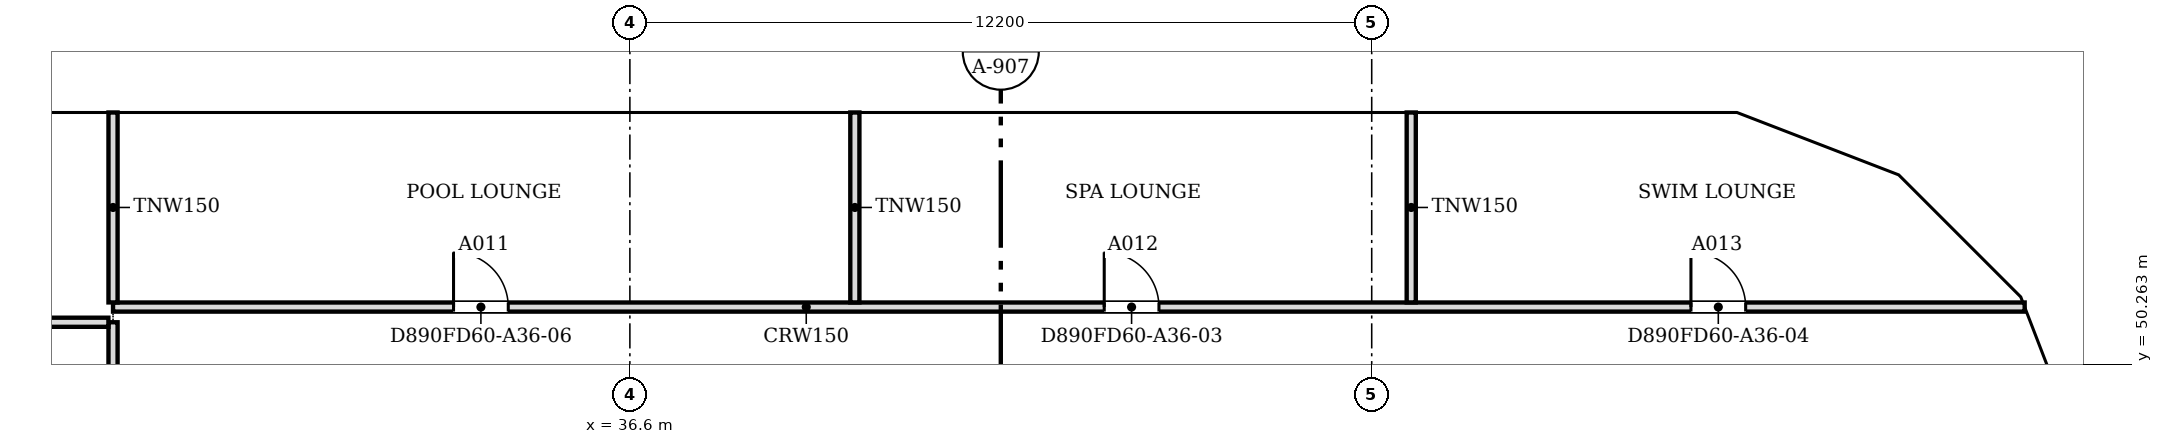
"""IFC4 building model, lengths in metres.
Left out: names, types, materials, properties, quantities, classifications, styles, units other than length and angle.
Written with IfcOpenShell. Run it as: python <this file> out.ifc"""

import sys

from ifc_helpers import new_model, si_unit, direction, frame, frame_2d, origin, place, context, subcontext, project, spatial, polyline, rectangle, outline, extrude, faceted_brep, source, transform, mapped, element, fill, save


model = new_model("IFC4")
c1 = context("Model", 3, precision=1e-05, world=origin(), true_north=direction((0.0, 1.0)))
c2 = subcontext(c1, "Body", "Model", "MODEL_VIEW")
j1 = project(units=[si_unit("LENGTHUNIT", "METRE"), si_unit("PLANEANGLEUNIT", "RADIAN")], contexts=[c1])
p1 = place(None, origin())
s1 = spatial("IfcSite", under=j1, at=p1, CompositionType="ELEMENT")
p2 = place(p1, origin())
s2 = spatial("IfcBuilding", under=s1, at=p2, CompositionType="ELEMENT")
p3 = place(p2, frame((0.0, 0.0, 236.9)))
s3 = spatial("IfcBuildingStorey", under=s2, at=p3, CompositionType="ELEMENT", Elevation=236.9)
m1 = source(origin(), c2, "Body", "Brep", [
    faceted_brep([(3.003, -0.25, 3.732), (2.95, -0.25, 3.8), (0.0, -0.25, 0.0), (3.003, -0.25, 0.0), (0.047, 0.25, 0.06), (2.898, 0.25, 3.732), (2.898, 0.25, 0.0), (0.047, 0.25, 0.0), (2.95, 0.0, 3.8), (0.0, 0.0, 0.0)], [[[0, 1, 2, 3]], [[4, 5, 6, 7]], [[8, 1, 0]], [[5, 4, 9, 2, 1, 8]], [[7, 6, 3, 2, 9]], [[7, 9, 4]], [[3, 6, 5, 8, 0]]]),
])
p4 = place(p3, frame((60.75, 48.753, 0.0), z_axis=(0.0, 0.0, 1.0), x_axis=(-0.35992665181, 0.932980602862, 0.0)))
e1 = element("IfcWall", 1, at=p4, inside=s3, PredefinedType="SOLIDWALL", context=c2, shape_type="MappedRepresentation", body=[
    mapped(m1, transform((0.0, 0.0, 0.0), scale=1.0)),
])
m2 = source(origin(), c2, "Body", "SweptSolid", [
    extrude(outline(polyline([(2.75, 3.135), (0.511, 0.25), (2.75, 0.25), (2.75, 3.135)])), frame((0.0, 0.26, 0.0), z_axis=(0.0, -1.0, 0.0), x_axis=(1.0, 0.0, 0.0)), (0.0, 0.0, 1.0), 0.52),
])
p5 = place(p4, origin())
e2 = element("IfcOpeningElement", 2, at=p5, cuts=e1, PredefinedType="OPENING", context=c2, shape_type="MappedRepresentation", body=[
    mapped(m2, transform((0.0, 0.0, 0.0), scale=1.0)),
])
m3 = source(origin(), c2, "Body", "Brep", [
    faceted_brep([(2.997, -0.25, 0.0), (0.053, -0.25, 3.8), (0.0, -0.25, 3.732), (0.0, -0.25, 0.0), (0.106, 0.25, 3.732), (2.944, 0.25, 0.068), (2.944, 0.25, 0.0), (0.106, 0.25, 0.0), (0.053, 0.0, 3.8), (2.997, 0.0, 0.0)], [[[0, 1, 2, 3]], [[4, 5, 6, 7]], [[5, 4, 8, 1, 0, 9]], [[2, 1, 8]], [[7, 6, 9, 0, 3]], [[7, 3, 2, 8, 4]], [[9, 6, 5]]]),
])
p6 = place(p3, frame((59.726, 51.469, 0.0), z_axis=(0.0, 0.0, 1.0), x_axis=(-0.707106781187, 0.707106781187, 0.0)))
e3 = element("IfcWall", 3, at=p6, inside=s3, PredefinedType="SOLIDWALL", context=c2, shape_type="MappedRepresentation", body=[
    mapped(m3, transform((0.0, 0.0, 0.0), scale=1.0)),
])
m4 = source(origin(), c2, "Body", "SweptSolid", [
    extrude(outline(polyline([(2.487, 0.25), (0.253, 3.134), (0.253, 0.25), (2.487, 0.25)])), frame((0.0, 0.26, 0.0), z_axis=(0.0, -1.0, 0.0), x_axis=(1.0, 0.0, 0.0)), (0.0, 0.0, 1.0), 0.52),
])
p7 = place(p6, origin())
e4 = element("IfcOpeningElement", 4, at=p7, cuts=e3, PredefinedType="OPENING", context=c2, shape_type="MappedRepresentation", body=[
    mapped(m4, transform((0.0, 0.0, 0.0), scale=1.0)),
])
m5 = source(origin(), c2, "Body", "Brep", [
    faceted_brep([(2.997, -0.25, 3.741), (2.95, -0.25, 3.8), (0.0, -0.25, 0.0), (2.997, -0.25, 0.0), (0.053, 0.25, 0.068), (2.904, 0.25, 3.74), (2.904, 0.25, 0.0), (0.053, 0.25, 0.0), (2.95, 0.0, 3.8), (0.0, 0.0, 0.0)], [[[0, 1, 2, 3]], [[4, 5, 6, 7]], [[8, 1, 0]], [[5, 4, 9, 2, 1, 8]], [[7, 6, 3, 2, 9]], [[7, 9, 4]], [[3, 6, 5, 8, 0]]]),
])
p8 = place(p3, frame((57.606, 53.588, 0.0), z_axis=(0.0, 0.0, 1.0), x_axis=(-0.932990326376, 0.359901446078, 0.0)))
e5 = element("IfcWall", 5, at=p8, inside=s3, PredefinedType="SOLIDWALL", context=c2, shape_type="MappedRepresentation", body=[
    mapped(m5, transform((0.0, 0.0, 0.0), scale=1.0)),
])
p9 = place(p8, origin())
e6 = element("IfcOpeningElement", 6, at=p9, cuts=e5, PredefinedType="OPENING", context=c2, shape_type="MappedRepresentation", body=[
    mapped(m2, transform((0.0, 0.0, 0.0), scale=1.0)),
])
m6 = source(origin(), c2, "Body", "Brep", [
    faceted_brep([(3.05, -0.25, 0.0), (0.047, -0.25, 3.8), (0.0, -0.25, 3.74), (0.0, -0.25, 0.0), (0.093, 0.25, 3.741), (3.05, 0.25, 0.0), (0.093, 0.25, 0.0), (0.047, 0.0, 3.8)], [[[0, 1, 2, 3]], [[4, 5, 6]], [[5, 4, 7, 1, 0]], [[2, 1, 7]], [[6, 5, 0, 3]], [[6, 3, 2, 7, 4]]]),
])
p10 = place(p3, frame((54.9, 54.65, 0.0), z_axis=(0.0, 0.0, 1.0), x_axis=(-1.0, 0.0, 0.0)))
e7 = element("IfcWall", 7, at=p10, inside=s3, PredefinedType="SOLIDWALL", context=c2, shape_type="MappedRepresentation", body=[
    mapped(m6, transform((0.0, 0.0, 0.0), scale=1.0)),
])
m7 = source(origin(), c2, "Body", "SweptSolid", [
    extrude(outline(polyline([(2.534, 0.25), (0.247, 3.144), (0.247, 0.25), (2.534, 0.25)])), frame((0.0, 0.26, 0.0), z_axis=(0.0, -1.0, 0.0), x_axis=(1.0, 0.0, 0.0)), (0.0, 0.0, 1.0), 0.52),
])
p11 = place(p10, origin())
e8 = element("IfcOpeningElement", 8, at=p11, cuts=e7, PredefinedType="OPENING", context=c2, shape_type="MappedRepresentation", body=[
    mapped(m7, transform((0.0, 0.0, 0.0), scale=1.0)),
])
m8 = source(origin(), c2, "Body", "SweptSolid", [
    extrude(outline(polyline([(6.1, 0.0), (3.05, 3.8), (0.0, 0.0), (6.1, 0.0)])), frame((0.0, 0.25, 0.0), z_axis=(0.0, -1.0, 0.0), x_axis=(1.0, 0.0, 0.0)), (0.0, 0.0, 1.0), 0.5),
])
p12 = place(p3, frame((51.85, 54.65, 0.0), z_axis=(0.0, 0.0, 1.0), x_axis=(-1.0, 0.0, 0.0)))
e9 = element("IfcWall", 9, at=p12, inside=s3, PredefinedType="SOLIDWALL", context=c2, shape_type="MappedRepresentation", body=[
    mapped(m8, transform((0.0, 0.0, 0.0), scale=1.0)),
])
m9 = source(origin(), c2, "Body", "SweptSolid", [
    extrude(outline(polyline([(5.579, 0.25), (3.05, 3.401), (0.521, 0.25), (5.579, 0.25)])), frame((0.0, 0.26, 0.0), z_axis=(0.0, -1.0, 0.0), x_axis=(1.0, 0.0, 0.0)), (0.0, 0.0, 1.0), 0.52),
])
p13 = place(p12, origin())
e10 = element("IfcOpeningElement", 10, at=p13, cuts=e9, PredefinedType="OPENING", context=c2, shape_type="MappedRepresentation", body=[
    mapped(m9, transform((0.0, 0.0, 0.0), scale=1.0)),
])
p14 = place(p3, frame((45.75, 54.65, 0.0), z_axis=(0.0, 0.0, 1.0), x_axis=(-1.0, 0.0, 0.0)))
e11 = element("IfcWall", 11, at=p14, inside=s3, PredefinedType="SOLIDWALL", context=c2, shape_type="MappedRepresentation", body=[
    mapped(m8, transform((0.0, 0.0, 0.0), scale=1.0)),
])
p15 = place(p14, origin())
e12 = element("IfcOpeningElement", 12, at=p15, cuts=e11, PredefinedType="OPENING", context=c2, shape_type="MappedRepresentation", body=[
    mapped(m9, transform((0.0, 0.0, 0.0), scale=1.0)),
])
m10 = source(origin(), c2, "Body", "Brep", [
    faceted_brep([(6.1, -0.25, 0.0), (3.05, -0.25, 3.8), (0.0, -0.25, 0.0), (6.1, -0.25, 0.0), (0.0, 0.25, 0.0), (3.05, 0.25, 3.8), (6.1, 0.25, 0.0), (6.1, 0.25, 0.0)], [[[0, 1, 2, 3]], [[4, 5, 6, 7]], [[6, 5, 1, 0]], [[5, 4, 2, 1]], [[4, 7, 3, 2]], [[3, 7, 6, 0]]]),
])
p16 = place(p3, frame((39.65, 54.65, 0.0), z_axis=(0.0, 0.0, 1.0), x_axis=(-1.0, 0.0, 0.0)))
e13 = element("IfcWall", 13, at=p16, inside=s3, PredefinedType="SOLIDWALL", context=c2, shape_type="MappedRepresentation", body=[
    mapped(m10, transform((0.0, 0.0, 0.0), scale=1.0)),
])
p17 = place(p16, origin())
e14 = element("IfcOpeningElement", 14, at=p17, cuts=e13, PredefinedType="OPENING", context=c2, shape_type="MappedRepresentation", body=[
    mapped(m9, transform((0.0, 0.0, 0.0), scale=1.0)),
])
p18 = place(p3, frame((33.55, 54.65, 0.0), z_axis=(0.0, 0.0, 1.0), x_axis=(-1.0, 0.0, 0.0)))
e15 = element("IfcWall", 15, at=p18, inside=s3, PredefinedType="SOLIDWALL", context=c2, shape_type="MappedRepresentation", body=[
    mapped(m8, transform((0.0, 0.0, 0.0), scale=1.0)),
])
p19 = place(p18, origin())
e16 = element("IfcOpeningElement", 16, at=p19, cuts=e15, PredefinedType="OPENING", context=c2, shape_type="MappedRepresentation", body=[
    mapped(m9, transform((0.0, 0.0, 0.0), scale=1.0)),
])
p20 = place(p3, frame((27.45, 54.65, 0.0), z_axis=(0.0, 0.0, 1.0), x_axis=(-1.0, 0.0, 0.0)))
e17 = element("IfcWall", 17, at=p20, inside=s3, PredefinedType="SOLIDWALL", context=c2, shape_type="MappedRepresentation", body=[
    mapped(m10, transform((0.0, 0.0, 0.0), scale=1.0)),
])
p21 = place(p20, origin())
e18 = element("IfcOpeningElement", 18, at=p21, cuts=e17, PredefinedType="OPENING", context=c2, shape_type="MappedRepresentation", body=[
    mapped(m9, transform((0.0, 0.0, 0.0), scale=1.0)),
])
p22 = place(p2, frame((0.0, 0.0, 240.7)))
s4 = spatial("IfcBuildingStorey", under=s2, at=p22, CompositionType="ELEMENT", Elevation=240.7)
m11 = source(origin(), c2, "Body", "Brep", [
    faceted_brep([(0.047, -0.25, 0.0), (2.997, -0.25, 3.8), (0.047, -0.25, 7.6), (0.0, -0.25, 7.541), (0.0, -0.25, 0.059), (0.093, 0.25, 7.54), (2.944, 0.25, 3.868), (2.944, 0.25, 3.732), (0.093, 0.25, 0.06), (2.997, 0.0, 3.8), (0.047, 0.0, 0.0), (0.047, 0.0, 7.6)], [[[0, 1, 2, 3, 4]], [[5, 6, 7, 8]], [[8, 7, 9, 1, 0, 10]], [[6, 5, 11, 2, 1, 9]], [[3, 2, 11]], [[10, 0, 4]], [[8, 10, 4, 3, 11, 5]], [[9, 7, 6]]]),
])
p23 = place(p22, frame((60.767, 48.71, -3.8), z_axis=(0.0, 0.0, 1.0), x_axis=(-0.359901446078, 0.932990326376, 0.0)))
e19 = element("IfcWall", 19, at=p23, inside=s4, PredefinedType="SOLIDWALL", context=c2, shape_type="MappedRepresentation", body=[
    mapped(m11, transform((0.0, 0.0, 0.0), scale=1.0)),
])
m12 = source(origin(), c2, "Body", "SweptSolid", [
    extrude(outline(polyline([(0.247, 0.665), (2.681, 3.8), (0.247, 6.935), (0.247, 0.665)])), frame((0.0, 0.26, 0.0), z_axis=(0.0, -1.0, 0.0), x_axis=(1.0, 0.0, 0.0)), (0.0, 0.0, 1.0), 0.52),
])
p24 = place(p23, origin())
e20 = element("IfcOpeningElement", 20, at=p24, cuts=e19, PredefinedType="OPENING", context=c2, shape_type="MappedRepresentation", body=[
    mapped(m12, transform((0.0, 0.0, 0.0), scale=1.0)),
])
m13 = source(origin(), c2, "Body", "Brep", [
    faceted_brep([(2.944, -0.25, 0.0), (2.997, -0.25, 0.068), (2.997, -0.25, 7.532), (2.944, -0.25, 7.6), (0.0, -0.25, 3.8), (0.053, 0.25, 3.868), (2.891, 0.25, 7.532), (2.891, 0.25, 0.068), (0.053, 0.25, 3.732), (2.944, 0.0, 0.0), (2.944, 0.0, 7.6), (0.0, 0.0, 3.8)], [[[0, 1, 2, 3, 4]], [[5, 6, 7, 8]], [[1, 0, 9]], [[10, 3, 2]], [[6, 5, 11, 4, 3, 10]], [[8, 7, 9, 0, 4, 11]], [[8, 11, 5]], [[1, 9, 7, 6, 10, 2]]]),
])
p25 = place(p22, frame((59.688, 51.506, -3.8), z_axis=(0.0, 0.0, 1.0), x_axis=(-0.707106781187, 0.707106781187, 0.0)))
e21 = element("IfcWall", 21, at=p25, inside=s4, PredefinedType="SOLIDWALL", context=c2, shape_type="MappedRepresentation", body=[
    mapped(m13, transform((0.0, 0.0, 0.0), scale=1.0)),
])
m14 = source(origin(), c2, "Body", "SweptSolid", [
    extrude(outline(polyline([(2.744, 6.934), (0.316, 3.8), (2.744, 0.667), (2.744, 6.934)])), frame((0.0, 0.26, 0.0), z_axis=(0.0, -1.0, 0.0), x_axis=(1.0, 0.0, 0.0)), (0.0, 0.0, 1.0), 0.52),
])
p26 = place(p25, origin())
e22 = element("IfcOpeningElement", 22, at=p26, cuts=e21, PredefinedType="OPENING", context=c2, shape_type="MappedRepresentation", body=[
    mapped(m14, transform((0.0, 0.0, 0.0), scale=1.0)),
])
m15 = source(origin(), c2, "Body", "Brep", [
    faceted_brep([(0.053, -0.25, 0.0), (3.003, -0.25, 3.8), (0.053, -0.25, 7.6), (0.0, -0.25, 7.532), (0.0, -0.25, 0.068), (0.106, 0.25, 7.532), (2.957, 0.25, 3.86), (2.957, 0.25, 3.74), (0.106, 0.25, 0.068), (3.003, 0.0, 3.8), (0.053, 0.0, 0.0), (0.053, 0.0, 7.6)], [[[0, 1, 2, 3, 4]], [[5, 6, 7, 8]], [[8, 7, 9, 1, 0, 10]], [[6, 5, 11, 2, 1, 9]], [[3, 2, 11]], [[10, 0, 4]], [[8, 10, 4, 3, 11, 5]], [[9, 7, 6]]]),
])
p27 = place(p22, frame((57.656, 53.569, -3.8), z_axis=(0.0, 0.0, 1.0), x_axis=(-0.933007896601, 0.359855894603, 0.0)))
e23 = element("IfcWall", 23, at=p27, inside=s4, PredefinedType="SOLIDWALL", context=c2, shape_type="MappedRepresentation", body=[
    mapped(m15, transform((0.0, 0.0, 0.0), scale=1.0)),
])
m16 = source(origin(), c2, "Body", "SweptSolid", [
    extrude(outline(polyline([(0.253, 0.665), (2.687, 3.8), (0.253, 6.935), (0.253, 0.665)])), frame((0.0, 0.26, 0.0), z_axis=(0.0, -1.0, 0.0), x_axis=(1.0, 0.0, 0.0)), (0.0, 0.0, 1.0), 0.52),
])
p28 = place(p27, origin())
e24 = element("IfcOpeningElement", 24, at=p28, cuts=e23, PredefinedType="OPENING", context=c2, shape_type="MappedRepresentation", body=[
    mapped(m16, transform((0.0, 0.0, 0.0), scale=1.0)),
])
m17 = source(origin(), c2, "Body", "Brep", [
    faceted_brep([(3.003, -0.25, 0.0), (6.053, -0.25, 3.8), (3.003, -0.25, 7.6), (0.0, -0.25, 3.8), (0.047, 0.25, 3.859), (3.003, 0.25, 7.6), (6.053, 0.25, 3.8), (3.003, 0.25, 0.0), (0.047, 0.25, 3.741), (0.0, 0.0, 3.8)], [[[0, 1, 2, 3]], [[4, 5, 6, 7, 8]], [[7, 6, 1, 0]], [[6, 5, 2, 1]], [[5, 4, 9, 3, 2]], [[8, 7, 0, 3, 9]], [[8, 9, 4]]]),
])
p29 = place(p22, frame((54.854, 54.65, -3.8), z_axis=(0.0, 0.0, 1.0), x_axis=(-1.0, 0.0, 0.0)))
e25 = element("IfcWall", 25, at=p29, inside=s4, PredefinedType="SOLIDWALL", context=c2, shape_type="MappedRepresentation", body=[
    mapped(m17, transform((0.0, 0.0, 0.0), scale=1.0)),
])
m18 = source(origin(), c2, "Body", "SweptSolid", [
    extrude(outline(polyline([(3.005, 0.401), (5.733, 3.8), (3.005, 7.199), (0.319, 3.8), (3.005, 0.401)])), frame((0.0, 0.26, 0.0), z_axis=(0.0, -1.0, 0.0), x_axis=(1.0, 0.0, 0.0)), (0.0, 0.0, 1.0), 0.52),
])
p30 = place(p29, origin())
e26 = element("IfcOpeningElement", 26, at=p30, cuts=e25, PredefinedType="OPENING", context=c2, shape_type="MappedRepresentation", body=[
    mapped(m18, transform((0.0, 0.0, 0.0), scale=1.0)),
])
m19 = source(origin(), c2, "Body", "SweptSolid", [
    extrude(outline(polyline([(3.05, 0.0), (6.1, 3.8), (3.05, 7.6), (0.0, 3.8), (3.05, 0.0)])), frame((0.0, 0.25, 0.0), z_axis=(0.0, -1.0, 0.0), x_axis=(1.0, 0.0, 0.0)), (0.0, 0.0, 1.0), 0.5),
])
p31 = place(p22, frame((48.8, 54.65, -3.8), z_axis=(0.0, 0.0, 1.0), x_axis=(-1.0, 0.0, 0.0)))
e27 = element("IfcWall", 27, at=p31, inside=s4, PredefinedType="SOLIDWALL", context=c2, shape_type="MappedRepresentation", body=[
    mapped(m19, transform((0.0, 0.0, 0.0), scale=1.0)),
])
m20 = source(origin(), c2, "Body", "SweptSolid", [
    extrude(outline(polyline([(3.05, 0.399), (5.78, 3.8), (3.05, 7.201), (0.321, 3.8), (3.05, 0.399)])), frame((0.0, 0.26, 0.0), z_axis=(0.0, -1.0, 0.0), x_axis=(1.0, 0.0, 0.0)), (0.0, 0.0, 1.0), 0.52),
])
p32 = place(p31, origin())
e28 = element("IfcOpeningElement", 28, at=p32, cuts=e27, PredefinedType="OPENING", context=c2, shape_type="MappedRepresentation", body=[
    mapped(m20, transform((0.0, 0.0, 0.0), scale=1.0)),
])
m21 = source(origin(), c2, "Body", "Brep", [
    faceted_brep([(3.05, -0.25, 0.0), (6.1, -0.25, 3.8), (6.1, -0.25, 3.8), (3.05, -0.25, 7.6), (0.0, -0.25, 3.8), (0.0, 0.25, 3.8), (3.05, 0.25, 7.6), (6.1, 0.25, 3.8), (6.1, 0.25, 3.8), (3.05, 0.25, 0.0)], [[[0, 1, 2, 3, 4]], [[5, 6, 7, 8, 9]], [[9, 8, 1, 0]], [[7, 6, 3, 2]], [[6, 5, 4, 3]], [[5, 9, 0, 4]], [[1, 8, 7, 2]]]),
])
p33 = place(p22, frame((42.7, 54.65, -3.8), z_axis=(0.0, 0.0, 1.0), x_axis=(-1.0, 0.0, 0.0)))
e29 = element("IfcWall", 29, at=p33, inside=s4, PredefinedType="SOLIDWALL", context=c2, shape_type="MappedRepresentation", body=[
    mapped(m21, transform((0.0, 0.0, 0.0), scale=1.0)),
])
p34 = place(p33, origin())
e30 = element("IfcOpeningElement", 30, at=p34, cuts=e29, PredefinedType="OPENING", context=c2, shape_type="MappedRepresentation", body=[
    mapped(m20, transform((0.0, 0.0, 0.0), scale=1.0)),
])
p35 = place(p22, frame((36.6, 54.65, -3.8), z_axis=(0.0, 0.0, 1.0), x_axis=(-1.0, 0.0, 0.0)))
e31 = element("IfcWall", 31, at=p35, inside=s4, PredefinedType="SOLIDWALL", context=c2, shape_type="MappedRepresentation", body=[
    mapped(m19, transform((0.0, 0.0, 0.0), scale=1.0)),
])
p36 = place(p35, origin())
e32 = element("IfcOpeningElement", 32, at=p36, cuts=e31, PredefinedType="OPENING", context=c2, shape_type="MappedRepresentation", body=[
    mapped(m20, transform((0.0, 0.0, 0.0), scale=1.0)),
])
p37 = place(p22, frame((30.5, 54.65, -3.8), z_axis=(0.0, 0.0, 1.0), x_axis=(-1.0, 0.0, 0.0)))
e33 = element("IfcWall", 33, at=p37, inside=s4, PredefinedType="SOLIDWALL", context=c2, shape_type="MappedRepresentation", body=[
    mapped(m19, transform((0.0, 0.0, 0.0), scale=1.0)),
])
p38 = place(p37, origin())
e34 = element("IfcOpeningElement", 34, at=p38, cuts=e33, PredefinedType="OPENING", context=c2, shape_type="MappedRepresentation", body=[
    mapped(m20, transform((0.0, 0.0, 0.0), scale=1.0)),
])
p39 = place(p3, frame((28.1, 47.776, 0.0), z_axis=(0.0, 0.0, 1.0), x_axis=(0.0, 1.0, 0.0)))
e35 = element("IfcWall", 35, at=p39, inside=s3, PredefinedType="PARTITIONING", context=c2, shape_type="SweptSolid", body=[
    extrude(rectangle(XDim=3.174, YDim=0.15, at=frame_2d((1.587, 0.0))), origin(), (0.0, 0.0, 1.0), 3.067),
])
p40 = place(p3, frame((22.75, 50.95, 0.0), z_axis=(0.0, 0.0, 1.0), x_axis=(1.0, 0.0, 0.0)))
e36 = element("IfcWall", 36, at=p40, inside=s3, PredefinedType="PARTITIONING", context=c2, shape_type="SweptSolid", body=[
    extrude(rectangle(XDim=5.274, YDim=0.15, at=frame_2d((2.637, 0.0))), origin(), (0.0, 0.0, 1.0), 3.067),
])
m22 = source(origin(), c2, "Body", "SweptSolid", [
    extrude(rectangle(XDim=0.9, YDim=2.1, at=frame_2d((0.45, 1.05))), frame((0.0, 0.085, 0.0), z_axis=(0.0, -1.0, 0.0), x_axis=(1.0, 0.0, 0.0)), (0.0, 0.0, 1.0), 0.17),
])
p41 = place(p40, frame((2.2, 0.0, 0.0)))
e37 = element("IfcOpeningElement", 37, at=p41, cuts=e36, PredefinedType="OPENING", context=c2, shape_type="MappedRepresentation", body=[
    mapped(m22, transform((0.0, 0.0, 0.0), scale=1.0)),
])
p42 = place(p3, frame((28.1, 51.2, 0.0), z_axis=(0.0, 0.0, 1.0), x_axis=(1.0, 0.0, 0.0)))
e38 = element("IfcWall", 38, at=p42, inside=s3, PredefinedType="PARTITIONING", context=c2, shape_type="SweptSolid", body=[
    extrude(rectangle(XDim=31.438, YDim=0.15, at=frame_2d((15.719, 0.0))), origin(), (0.0, 0.0, 1.0), 3.067),
])
p43 = place(p42, frame((16.301, 0.0, 0.0)))
e39 = element("IfcOpeningElement", 39, at=p43, cuts=e38, PredefinedType="OPENING", context=c2, shape_type="MappedRepresentation", body=[
    mapped(m22, transform((0.0, 0.0, 0.0), scale=1.0)),
])
p44 = place(p42, frame((25.95, 0.0, 0.0)))
e40 = element("IfcOpeningElement", 40, at=p44, cuts=e38, PredefinedType="OPENING", context=c2, shape_type="MappedRepresentation", body=[
    mapped(m22, transform((0.0, 0.0, 0.0), scale=1.0)),
])
p45 = place(p42, frame((5.6, 0.0, 0.0)))
e41 = element("IfcOpeningElement", 41, at=p45, cuts=e38, PredefinedType="OPENING", context=c2, shape_type="MappedRepresentation", body=[
    mapped(m22, transform((0.0, 0.0, 0.0), scale=1.0)),
])
for number, where, z_axis, x_axis in (
    (42, (28.1, 51.276, 0.0), (0.0, 0.0, 1.0), (0.0, 1.0, 0.0)),
    (43, (40.3, 51.276, 0.0), (0.0, 0.0, 1.0), (0.0, 1.0, 0.0)),
    (44, (49.45, 51.276, 0.0), (0.0, 0.0, 1.0), (0.0, 1.0, 0.0)),
):
    element("IfcWall", number, at=place(p3, frame(where, z_axis=z_axis, x_axis=x_axis)), inside=s3, PredefinedType="PARTITIONING", context=c2, shape_type="SweptSolid", body=[
        extrude(rectangle(XDim=3.124, YDim=0.15, at=frame_2d((1.562, 0.0))), origin(), (0.0, 0.0, 1.0), 3.067),
    ])
m23 = source(origin(), c2, "Body", "SweptSolid", [
    extrude(rectangle(XDim=0.9, YDim=2.1, at=frame_2d((0.45, 1.05))), frame((0.0, 0.025, 0.0), z_axis=(0.0, -1.0, 0.0), x_axis=(1.0, 0.0, 0.0)), (0.0, 0.0, 1.0), 0.05),
])
p46 = place(p43, origin())
e45 = element("IfcDoor", 45, at=p46, inside=s3, OperationType="SINGLE_SWING_LEFT", PredefinedType="DOOR", context=c2, shape_type="MappedRepresentation", body=[
    mapped(m23, transform((0.0, 0.0, 0.0), scale=1.0)),
])
fill(e39, e45)
p47 = place(p44, origin())
e46 = element("IfcDoor", 46, at=p47, inside=s3, OperationType="SINGLE_SWING_LEFT", PredefinedType="DOOR", context=c2, shape_type="MappedRepresentation", body=[
    mapped(m23, transform((0.0, 0.0, 0.0), scale=1.0)),
])
fill(e40, e46)
p48 = place(p45, origin())
e47 = element("IfcDoor", 47, at=p48, inside=s3, OperationType="SINGLE_SWING_LEFT", PredefinedType="DOOR", context=c2, shape_type="MappedRepresentation", body=[
    mapped(m23, transform((0.0, 0.0, 0.0), scale=1.0)),
])
fill(e41, e47)
save(model, sys.argv[1])
